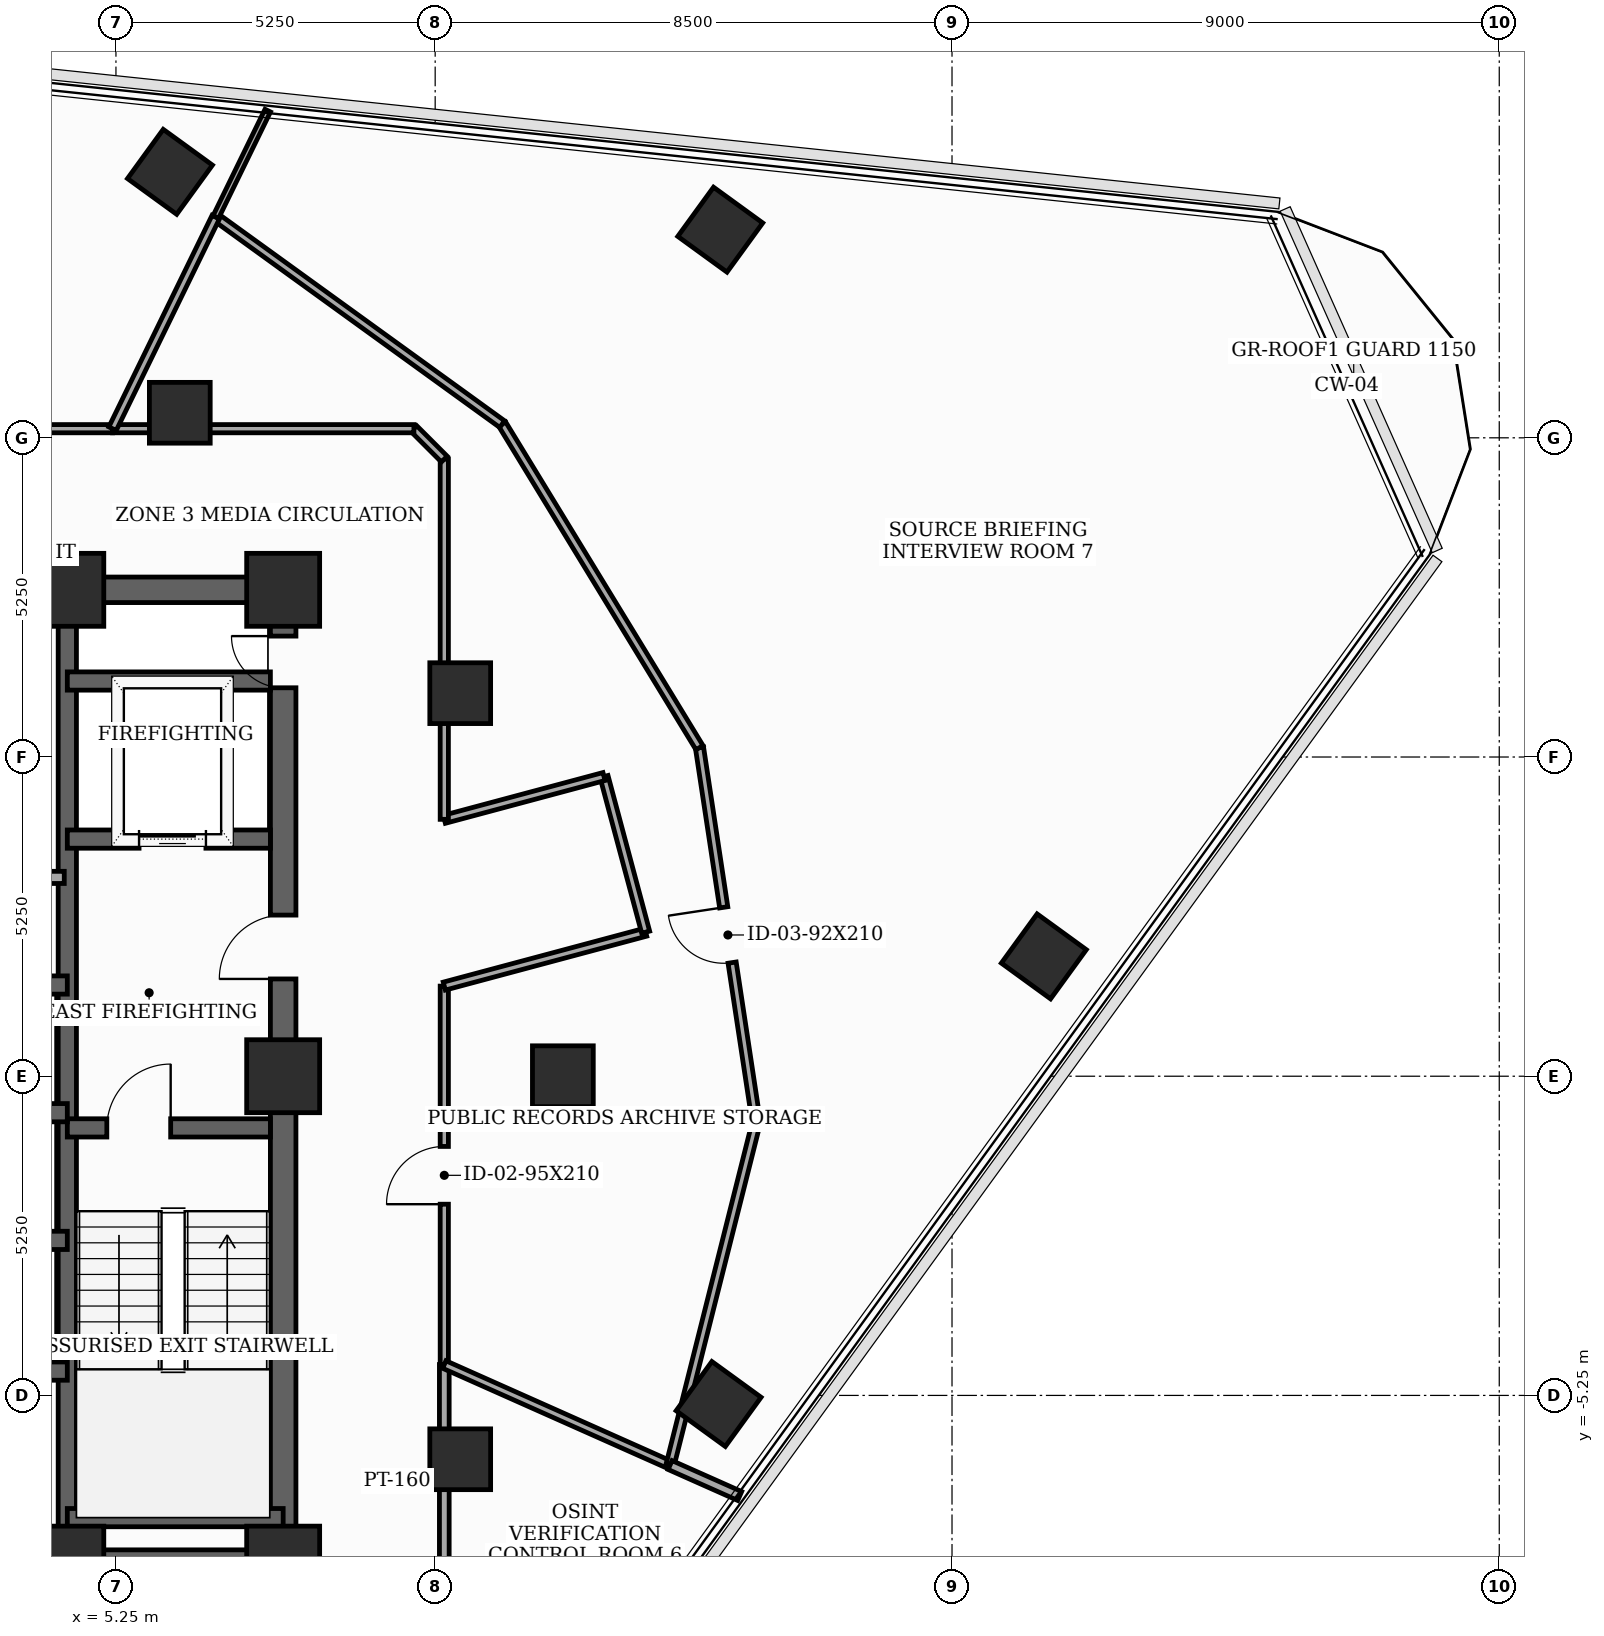
"""IFC4 building model, lengths in metres.
Left out: names, types, materials, properties, quantities, classifications, styles, units other than length and angle.
Written with IfcOpenShell. Run it as: python <this file> out.ifc"""

import sys

from ifc_helpers import new_model, si_unit, direction, frame, frame_2d, origin, origin_2d, place, context, subcontext, project, spatial, rectangle, extrude, element, fill, save


model = new_model("IFC4")
c1 = context("Model", 3, precision=1e-05, world=origin(), true_north=direction((0.0, 1.0)))
c2 = subcontext(c1, "Body", "Model", "MODEL_VIEW")
j1 = project(units=[si_unit("LENGTHUNIT", "METRE"), si_unit("PLANEANGLEUNIT", "RADIAN")], contexts=[c1])
p1 = place(None, origin())
s1 = spatial("IfcSite", under=j1, at=p1, CompositionType="ELEMENT")
p2 = place(p1, origin())
s2 = spatial("IfcBuilding", under=s1, at=p2, CompositionType="ELEMENT")
p3 = place(p2, frame((0.0, 0.0, 230.0)))
s3 = spatial("IfcBuildingStorey", under=s2, at=p3, CompositionType="ELEMENT", Elevation=230.0)
for number, where, z_axis, x_axis in (
    (1, (4.45, -8.0, 0.0), (0.0, 0.0, 1.0), (1.0, 0.0, 0.0)),
    (2, (8.0, -8.0, 0.0), (0.0, 0.0, 1.0), (1.0, 0.0, 0.0)),
    (3, (8.0, 0.0, 0.0), (0.0, 0.0, 1.0), (1.0, 0.0, 0.0)),
    (4, (8.0, 8.0, 0.0), (0.0, 0.0, 1.0), (1.0, 0.0, 0.0)),
    (5, (4.45, 8.0, 0.0), (0.0, 0.0, 1.0), (1.0, 0.0, 0.0)),
):
    element("IfcColumn", number, at=place(p3, frame(where, z_axis=z_axis, x_axis=x_axis)), inside=s3, PredefinedType="COLUMN", context=c2, shape_type="SweptSolid", body=[
        extrude(rectangle(XDim=1.2, YDim=1.2, at=origin_2d()), origin(), (0.0, 0.0, 1.0), 3.7),
    ])
for number, where, z_axis, x_axis in (
    (6, (12.6, 0.0, 0.0), (0.0, 0.0, 1.0), (1.0, 0.0, 0.0)),
    (7, (10.912, 6.3, 0.0), (0.0, 0.0, 1.0), (1.0, 0.0, 0.0)),
    (8, (6.3, 10.912, 0.0), (0.0, 0.0, 1.0), (1.0, 0.0, 0.0)),
    (9, (10.912, -6.3, 0.0), (0.0, 0.0, 1.0), (1.0, 0.0, 0.0)),
    (10, (15.161, -5.391, 0.0), (0.0, 0.0, 1.0), (0.588, 0.809, 0.0)),
    (11, (20.51, 1.971, 0.0), (0.0, 0.0, 1.0), (0.588, 0.809, 0.0)),
    (12, (15.188, 13.923, 0.0), (0.0, 0.0, 1.0), (0.588, 0.809, 0.0)),
    (13, (6.138, 14.875, 0.0), (0.0, 0.0, 1.0), (0.588, 0.809, 0.0)),
):
    element("IfcColumn", number, at=place(p3, frame(where, z_axis=z_axis, x_axis=x_axis)), inside=s3, PredefinedType="COLUMN", context=c2, shape_type="SweptSolid", body=[
        extrude(rectangle(XDim=1.0, YDim=1.0, at=origin_2d()), origin(), (0.0, 0.0, 1.0), 3.7),
    ])
p4 = place(p3, frame((8.0, -8.0, 0.0), z_axis=(0.0, 0.0, 1.0), x_axis=(0.0, 1.0, 0.0)))
e14 = element("IfcWall", 14, at=p4, inside=s3, PredefinedType="SHEAR", context=c2, shape_type="SweptSolid", body=[
    extrude(rectangle(XDim=16.0, YDim=0.42, at=frame_2d((8.0, 0.0))), origin(), (0.0, 0.0, 1.0), 3.5),
])
p5 = place(p4, frame((9.6, 0.0, 0.0)))
e15 = element("IfcOpeningElement", 15, at=p5, cuts=e14, PredefinedType="OPENING", context=c2, shape_type="SweptSolid", body=[
    extrude(rectangle(XDim=1.05, YDim=2.15, at=frame_2d((0.525, 1.075))), frame((0.0, 0.22, 0.0), z_axis=(0.0, -1.0, 0.0), x_axis=(1.0, 0.0, 0.0)), (0.0, 0.0, 1.0), 0.44),
])
p6 = place(p4, frame((14.389, 0.0, 0.0)))
e16 = element("IfcOpeningElement", 16, at=p6, cuts=e14, PredefinedType="OPENING", context=c2, shape_type="SweptSolid", body=[
    extrude(rectangle(XDim=0.85, YDim=2.02, at=frame_2d((0.425, 1.01))), frame((0.0, 0.22, 0.0), z_axis=(0.0, -1.0, 0.0), x_axis=(1.0, 0.0, 0.0)), (0.0, 0.0, 1.0), 0.44),
])
p7 = place(p3, frame((-8.0, -8.0, 0.0), z_axis=(0.0, 0.0, 1.0), x_axis=(1.0, 0.0, 0.0)))
e17 = element("IfcWall", 17, at=p7, inside=s3, PredefinedType="SHEAR", context=c2, shape_type="SweptSolid", body=[
    extrude(rectangle(XDim=16.0, YDim=0.42, at=frame_2d((8.0, 0.0))), origin(), (0.0, 0.0, 1.0), 3.5),
])
p8 = place(p7, frame((5.2, 0.0, 0.0)))
e18 = element("IfcOpeningElement", 18, at=p8, cuts=e17, PredefinedType="OPENING", context=c2, shape_type="SweptSolid", body=[
    extrude(rectangle(XDim=0.95, YDim=2.1, at=frame_2d((0.475, 1.05))), frame((0.0, 0.22, 0.0), z_axis=(0.0, -1.0, 0.0), x_axis=(1.0, 0.0, 0.0)), (0.0, 0.0, 1.0), 0.44),
])
p9 = place(p7, frame((9.8, 0.0, 0.0)))
e19 = element("IfcOpeningElement", 19, at=p9, cuts=e17, PredefinedType="OPENING", context=c2, shape_type="SweptSolid", body=[
    extrude(rectangle(XDim=0.95, YDim=2.1, at=frame_2d((0.475, 1.05))), frame((0.0, 0.22, 0.0), z_axis=(0.0, -1.0, 0.0), x_axis=(1.0, 0.0, 0.0)), (0.0, 0.0, 1.0), 0.44),
])
p10 = place(p3, frame((-8.0, 8.0, 0.0), z_axis=(0.0, 0.0, 1.0), x_axis=(1.0, 0.0, 0.0)))
e20 = element("IfcWall", 20, at=p10, inside=s3, PredefinedType="SHEAR", context=c2, shape_type="SweptSolid", body=[
    extrude(rectangle(XDim=16.0, YDim=0.42, at=frame_2d((8.0, 0.0))), origin(), (0.0, 0.0, 1.0), 3.5),
])
p11 = place(p10, frame((7.1, 0.0, 0.0)))
e21 = element("IfcOpeningElement", 21, at=p11, cuts=e20, PredefinedType="OPENING", context=c2, shape_type="SweptSolid", body=[
    extrude(rectangle(XDim=1.8, YDim=2.15, at=frame_2d((0.9, 1.075))), frame((0.0, 0.22, 0.0), z_axis=(0.0, -1.0, 0.0), x_axis=(1.0, 0.0, 0.0)), (0.0, 0.0, 1.0), 0.44),
])
p12 = place(p3, frame((4.45, -7.79, 0.0), z_axis=(0.0, 0.0, 1.0), x_axis=(0.0, 1.0, 0.0)))
e22 = element("IfcWall", 22, at=p12, inside=s3, PredefinedType="SHEAR", context=c2, shape_type="SweptSolid", body=[
    extrude(rectangle(XDim=15.58, YDim=0.3, at=frame_2d((7.79, 0.0))), origin(), (0.0, 0.0, 1.0), 3.5),
])
p13 = place(p3, frame((4.45, -0.85, 0.0), z_axis=(0.0, 0.0, 1.0), x_axis=(1.0, 0.0, 0.0)))
e23 = element("IfcWall", 23, at=p13, inside=s3, PredefinedType="SHEAR", context=c2, shape_type="SweptSolid", body=[
    extrude(rectangle(XDim=3.34, YDim=0.3, at=frame_2d((1.67, 0.0))), origin(), (0.0, 0.0, 1.0), 3.5),
])
p14 = place(p13, frame((0.65, 0.0, 0.0)))
e24 = element("IfcOpeningElement", 24, at=p14, cuts=e23, PredefinedType="OPENING", context=c2, shape_type="SweptSolid", body=[
    extrude(rectangle(XDim=1.05, YDim=2.15, at=frame_2d((0.525, 1.075))), frame((0.0, 0.16, 0.0), z_axis=(0.0, -1.0, 0.0), x_axis=(1.0, 0.0, 0.0)), (0.0, 0.0, 1.0), 0.32),
])
p15 = place(p3, frame((4.45, -7.26, 0.0), z_axis=(0.0, 0.0, 1.0), x_axis=(1.0, 0.0, 0.0)))
e25 = element("IfcWall", 25, at=p15, inside=s3, PredefinedType="SHEAR", context=c2, shape_type="SweptSolid", body=[
    extrude(rectangle(XDim=3.55, YDim=0.3, at=frame_2d((1.775, 0.0))), origin(), (0.0, 0.0, 1.0), 3.5),
])
p16 = place(p3, frame((4.45, 3.9, 0.0), z_axis=(0.0, 0.0, 1.0), x_axis=(1.0, 0.0, 0.0)))
e26 = element("IfcWall", 26, at=p16, inside=s3, PredefinedType="SHEAR", context=c2, shape_type="SweptSolid", body=[
    extrude(rectangle(XDim=3.34, YDim=0.3, at=frame_2d((1.67, 0.0))), origin(), (0.0, 0.0, 1.0), 3.5),
])
p17 = place(p16, frame((1.18, 0.0, 0.0)))
e27 = element("IfcOpeningElement", 27, at=p17, cuts=e26, PredefinedType="OPENING", context=c2, shape_type="SweptSolid", body=[
    extrude(rectangle(XDim=1.1, YDim=2.1, at=frame_2d((0.55, 1.05))), frame((0.0, 0.16, 0.0), z_axis=(0.0, -1.0, 0.0), x_axis=(1.0, 0.0, 0.0)), (0.0, 0.0, 1.0), 0.32),
])
p18 = place(p3, frame((4.45, 6.5, 0.0), z_axis=(0.0, 0.0, 1.0), x_axis=(1.0, 0.0, 0.0)))
e28 = element("IfcWall", 28, at=p18, inside=s3, PredefinedType="SHEAR", context=c2, shape_type="SweptSolid", body=[
    extrude(rectangle(XDim=3.34, YDim=0.3, at=frame_2d((1.67, 0.0))), origin(), (0.0, 0.0, 1.0), 3.5),
])
p19 = place(p3, frame((-4.45, -4.85, 0.0), z_axis=(0.0, 0.0, 1.0), x_axis=(1.0, 0.0, 0.0)))
e29 = element("IfcWall", 29, at=p19, inside=s3, PredefinedType="SHEAR", context=c2, shape_type="SweptSolid", body=[
    extrude(rectangle(XDim=8.9, YDim=0.3, at=frame_2d((4.45, 0.0))), origin(), (0.0, 0.0, 1.0), 3.5),
])
for number, where, z_axis, x_axis in (
    (30, (1.68, 1.5, 0.0), (0.0, 0.0, 1.0), (1.0, 0.0, 0.0)),
    (31, (1.68, -2.7, 0.0), (0.0, 0.0, 1.0), (1.0, 0.0, 0.0)),
    (32, (1.68, -0.6, 0.0), (0.0, 0.0, 1.0), (1.0, 0.0, 0.0)),
):
    element("IfcWall", number, at=place(p3, frame(where, z_axis=z_axis, x_axis=x_axis)), inside=s3, PredefinedType="SHEAR", context=c2, shape_type="SweptSolid", body=[
        extrude(rectangle(XDim=2.77, YDim=0.3, at=frame_2d((1.385, 0.0))), origin(), (0.0, 0.0, 1.0), 3.5),
    ])
p20 = place(p3, frame((1.72, 3.27, 0.0), z_axis=(0.0, 0.0, 1.0), x_axis=(1.0, 0.0, 0.0)))
e33 = element("IfcWall", 33, at=p20, inside=s3, PredefinedType="SOLIDWALL", context=c2, shape_type="SweptSolid", body=[
    extrude(rectangle(XDim=2.68, YDim=0.2, at=frame_2d((1.34, 0.0))), origin(), (0.0, 0.0, 1.0), 3.5),
])
p21 = place(p3, frame((10.65, -4.742, 0.0), z_axis=(0.0, 0.0, 1.0), x_axis=(0.0, 1.0, 0.0)))
e34 = element("IfcWall", 34, at=p21, inside=s3, PredefinedType="PARTITIONING", context=c2, shape_type="SweptSolid", body=[
    extrude(rectangle(XDim=6.224, YDim=0.135, at=frame_2d((3.112, 0.0))), origin(), (0.0, 0.0, 1.0), 2.885),
])
p22 = place(p21, frame((2.637, 0.0, 0.0)))
e35 = element("IfcOpeningElement", 35, at=p22, cuts=e34, PredefinedType="OPENING", context=c2, shape_type="SweptSolid", body=[
    extrude(rectangle(XDim=0.95, YDim=2.1, at=frame_2d((0.475, 1.05))), frame((0.0, 0.077, 0.0), z_axis=(0.0, -1.0, 0.0), x_axis=(1.0, 0.0, 0.0)), (0.0, 0.0, 1.0), 0.155),
])
p23 = place(p3, frame((10.65, 1.482, 0.0), z_axis=(0.0, 0.0, 1.0), x_axis=(0.965961397105, 0.2586862565, 0.0)))
e36 = element("IfcWall", 36, at=p23, inside=s3, PredefinedType="PARTITIONING", context=c2, shape_type="SweptSolid", body=[
    extrude(rectangle(XDim=3.429, YDim=0.135, at=frame_2d((1.714, 0.0))), origin(), (0.0, 0.0, 1.0), 2.885),
])
p24 = place(p3, frame((13.962, 2.369, 0.0), z_axis=(0.0, 0.0, 1.0), x_axis=(-0.258413725385, 0.966034340245, 0.0)))
e37 = element("IfcWall", 37, at=p24, inside=s3, PredefinedType="PARTITIONING", context=c2, shape_type="SweptSolid", body=[
    extrude(rectangle(XDim=2.65, YDim=0.135, at=frame_2d((1.325, 0.0))), origin(), (0.0, 0.0, 1.0), 3.5),
])
p25 = place(p3, frame((13.277, 4.929, 0.0), z_axis=(0.0, 0.0, 1.0), x_axis=(-0.965934830229, -0.258785439601, 0.0)))
e38 = element("IfcWall", 38, at=p25, inside=s3, PredefinedType="PARTITIONING", context=c2, shape_type="SweptSolid", body=[
    extrude(rectangle(XDim=2.72, YDim=0.135, at=frame_2d((1.36, 0.0))), origin(), (0.0, 0.0, 1.0), 2.885),
])
p26 = place(p3, frame((10.65, 4.225, 0.0), z_axis=(0.0, 0.0, 1.0), x_axis=(0.0, 1.0, 0.0)))
e39 = element("IfcWall", 39, at=p26, inside=s3, PredefinedType="PARTITIONING", context=c2, shape_type="SweptSolid", body=[
    extrude(rectangle(XDim=5.925, YDim=0.135, at=frame_2d((2.962, 0.0))), origin(), (0.0, 0.0, 1.0), 2.885),
])
p27 = place(p3, frame((10.65, 10.15, 0.0), z_axis=(0.0, 0.0, 1.0), x_axis=(-0.707106781187, 0.707106781187, 0.0)))
e40 = element("IfcWall", 40, at=p27, inside=s3, PredefinedType="PARTITIONING", context=c2, shape_type="SweptSolid", body=[
    extrude(rectangle(XDim=0.707, YDim=0.135, at=frame_2d((0.354, 0.0))), origin(), (0.0, 0.0, 1.0), 3.5),
])
p28 = place(p3, frame((10.15, 10.65, 0.0), z_axis=(0.0, 0.0, 1.0), x_axis=(-1.0, 0.0, 0.0)))
e41 = element("IfcWall", 41, at=p28, inside=s3, PredefinedType="PARTITIONING", context=c2, shape_type="SweptSolid", body=[
    extrude(rectangle(XDim=4.956, YDim=0.135, at=frame_2d((2.478, 0.0))), origin(), (0.0, 0.0, 1.0), 2.885),
])
p29 = place(p3, frame((10.65, -10.15, 0.0), z_axis=(0.0, 0.0, 1.0), x_axis=(0.0, 1.0, 0.0)))
e42 = element("IfcWall", 42, at=p29, inside=s3, PredefinedType="PARTITIONING", context=c2, shape_type="SweptSolid", body=[
    extrude(rectangle(XDim=5.408, YDim=0.16, at=frame_2d((2.704, 0.0))), origin(), (0.0, 0.0, 1.0), 2.885),
])
p30 = place(p29, frame((0.582, 0.0, 0.0)))
e43 = element("IfcOpeningElement", 43, at=p30, cuts=e42, PredefinedType="OPENING", context=c2, shape_type="SweptSolid", body=[
    extrude(rectangle(XDim=1.0, YDim=2.15, at=frame_2d((0.5, 1.075))), frame((0.0, 0.09, 0.0), z_axis=(0.0, -1.0, 0.0), x_axis=(1.0, 0.0, 0.0)), (0.0, 0.0, 1.0), 0.18),
])
p31 = place(p3, frame((5.194, 10.65, 0.0), z_axis=(0.0, 0.0, 1.0), x_axis=(-1.0, 0.0, 0.0)))
e44 = element("IfcWall", 44, at=p31, inside=s3, PredefinedType="PARTITIONING", context=c2, shape_type="SweptSolid", body=[
    extrude(rectangle(XDim=6.344, YDim=0.135, at=frame_2d((3.172, 0.0))), origin(), (0.0, 0.0, 1.0), 2.885),
])
p32 = place(p31, frame((2.372, 0.0, 0.0)))
e45 = element("IfcOpeningElement", 45, at=p32, cuts=e44, PredefinedType="OPENING", context=c2, shape_type="SweptSolid", body=[
    extrude(rectangle(XDim=1.6, YDim=2.15, at=frame_2d((0.8, 1.075))), frame((0.0, 0.077, 0.0), z_axis=(0.0, -1.0, 0.0), x_axis=(1.0, 0.0, 0.0)), (0.0, 0.0, 1.0), 0.155),
])
p33 = place(p3, frame((10.65, -4.742, 0.0), z_axis=(0.0, 0.0, 1.0), x_axis=(0.913556239153, -0.406712426544, 0.0)))
e46 = element("IfcWall", 46, at=p33, inside=s3, PredefinedType="PARTITIONING", context=c2, shape_type="SweptSolid", body=[
    extrude(rectangle(XDim=4.064, YDim=0.135, at=frame_2d((2.032, 0.0))), origin(), (0.0, 0.0, 1.0), 2.885),
])
p34 = place(p3, frame((14.363, -6.395, 0.0), z_axis=(0.0, 0.0, 1.0), x_axis=(0.244106617879, 0.969748399899, 0.0)))
e47 = element("IfcWall", 47, at=p34, inside=s3, PredefinedType="PARTITIONING", context=c2, shape_type="SweptSolid", body=[
    extrude(rectangle(XDim=5.813, YDim=0.135, at=frame_2d((2.906, 0.0))), origin(), (0.0, 0.0, 1.0), 2.985),
])
p35 = place(p3, frame((15.782, -0.758, 0.0), z_axis=(0.0, 0.0, 1.0), x_axis=(-0.150025845784, 0.988682075086, 0.0)))
e48 = element("IfcWall", 48, at=p35, inside=s3, PredefinedType="PARTITIONING", context=c2, shape_type="SweptSolid", body=[
    extrude(rectangle(XDim=6.233, YDim=0.135, at=frame_2d((3.116, 0.0))), origin(), (0.0, 0.0, 1.0), 2.985),
])
p36 = place(p35, frame((2.656, 0.0, 0.0)))
e49 = element("IfcOpeningElement", 49, at=p36, cuts=e48, PredefinedType="OPENING", context=c2, shape_type="SweptSolid", body=[
    extrude(rectangle(XDim=0.92, YDim=2.1, at=frame_2d((0.46, 1.05))), frame((0.0, 0.077, 0.0), z_axis=(0.0, -1.0, 0.0), x_axis=(1.0, 0.0, 0.0)), (0.0, 0.0, 1.0), 0.155),
])
p37 = place(p3, frame((14.847, 5.404, 0.0), z_axis=(0.0, 0.0, 1.0), x_axis=(-0.520646426704, 0.853772392597, 0.0)))
e50 = element("IfcWall", 50, at=p37, inside=s3, PredefinedType="PARTITIONING", context=c2, shape_type="SweptSolid", body=[
    extrude(rectangle(XDim=6.232, YDim=0.135, at=frame_2d((3.116, 0.0))), origin(), (0.0, 0.0, 1.0), 2.985),
])
p38 = place(p3, frame((11.602, 10.725, 0.0), z_axis=(0.0, 0.0, 1.0), x_axis=(-0.810322435649, 0.58598425771, 0.0)))
e51 = element("IfcWall", 51, at=p38, inside=s3, PredefinedType="PARTITIONING", context=c2, shape_type="SweptSolid", body=[
    extrude(rectangle(XDim=5.812, YDim=0.135, at=frame_2d((2.906, 0.0))), origin(), (0.0, 0.0, 1.0), 3.5),
])
p39 = place(p3, frame((6.892, 14.131, 0.0), z_axis=(0.0, 0.0, 1.0), x_axis=(-0.438392584888, -0.898783589923, 0.0)))
e52 = element("IfcWall", 52, at=p39, inside=s3, PredefinedType="PARTITIONING", context=c2, shape_type="SweptSolid", body=[
    extrude(rectangle(XDim=3.873, YDim=0.135, at=frame_2d((1.937, 0.0))), origin(), (0.0, 0.0, 1.0), 2.885),
])
p40 = place(p3, frame((15.508, -6.905, 0.0), z_axis=(0.0, 0.0, 1.0), x_axis=(-0.913626692327, 0.406554137929, 0.0)))
e53 = element("IfcWall", 53, at=p40, inside=s3, PredefinedType="PARTITIONING", context=c2, shape_type="SweptSolid", body=[
    extrude(rectangle(XDim=1.253, YDim=0.16, at=frame_2d((0.626, 0.0))), origin(), (0.0, 0.0, 1.0), 3.035),
])
p41 = place(p3, frame((7.747, 15.882, 0.0), z_axis=(0.0, 0.0, 1.0), x_axis=(-0.438571753549, -0.898696176129, 0.0)))
e54 = element("IfcWall", 54, at=p41, inside=s3, PredefinedType="MOVABLE", context=c2, shape_type="SweptSolid", body=[
    extrude(rectangle(XDim=1.948, YDim=0.1, at=frame_2d((0.974, 0.0))), origin(), (0.0, 0.0, 1.0), 3.035),
])
p42 = place(p5, origin())
e55 = element("IfcDoor", 55, at=p42, inside=s3, OperationType="SINGLE_SWING_LEFT", PredefinedType="DOOR", context=c2, shape_type="SweptSolid", body=[
    extrude(rectangle(XDim=1.05, YDim=2.15, at=frame_2d((0.525, 1.075))), frame((0.0, 0.025, 0.0), z_axis=(0.0, -1.0, 0.0), x_axis=(1.0, 0.0, 0.0)), (0.0, 0.0, 1.0), 0.05),
])
fill(e15, e55)
p43 = place(p6, origin())
e56 = element("IfcDoor", 56, at=p43, inside=s3, OperationType="SINGLE_SWING_RIGHT", PredefinedType="TRAPDOOR", context=c2, shape_type="SweptSolid", body=[
    extrude(rectangle(XDim=0.85, YDim=2.02, at=frame_2d((0.425, 1.01))), frame((0.0, 0.025, 0.0), z_axis=(0.0, -1.0, 0.0), x_axis=(1.0, 0.0, 0.0)), (0.0, 0.0, 1.0), 0.05),
])
fill(e16, e56)
p44 = place(p14, origin())
e57 = element("IfcDoor", 57, at=p44, inside=s3, OperationType="SINGLE_SWING_RIGHT", PredefinedType="DOOR", context=c2, shape_type="SweptSolid", body=[
    extrude(rectangle(XDim=1.05, YDim=2.15, at=frame_2d((0.525, 1.075))), frame((0.0, 0.025, 0.0), z_axis=(0.0, -1.0, 0.0), x_axis=(1.0, 0.0, 0.0)), (0.0, 0.0, 1.0), 0.05),
])
fill(e24, e57)
p45 = place(p17, origin())
e58 = element("IfcDoor", 58, at=p45, inside=s3, OperationType="SLIDING_TO_LEFT", PredefinedType="DOOR", context=c2, shape_type="SweptSolid", body=[
    extrude(rectangle(XDim=1.1, YDim=2.1, at=frame_2d((0.55, 1.05))), frame((0.0, 0.025, 0.0), z_axis=(0.0, -1.0, 0.0), x_axis=(1.0, 0.0, 0.0)), (0.0, 0.0, 1.0), 0.05),
])
fill(e27, e58)
p46 = place(p22, origin())
e59 = element("IfcDoor", 59, at=p46, inside=s3, OperationType="SINGLE_SWING_LEFT", PredefinedType="DOOR", context=c2, shape_type="SweptSolid", body=[
    extrude(rectangle(XDim=0.95, YDim=2.1, at=frame_2d((0.475, 1.05))), frame((0.0, 0.025, 0.0), z_axis=(0.0, -1.0, 0.0), x_axis=(1.0, 0.0, 0.0)), (0.0, 0.0, 1.0), 0.05),
])
fill(e35, e59)
p47 = place(p36, origin())
e60 = element("IfcDoor", 60, at=p47, inside=s3, OperationType="SINGLE_SWING_RIGHT", PredefinedType="DOOR", context=c2, shape_type="SweptSolid", body=[
    extrude(rectangle(XDim=0.92, YDim=2.1, at=frame_2d((0.46, 1.05))), frame((0.0, 0.025, 0.0), z_axis=(0.0, -1.0, 0.0), x_axis=(1.0, 0.0, 0.0)), (0.0, 0.0, 1.0), 0.05),
])
fill(e49, e60)
save(model, sys.argv[1])
